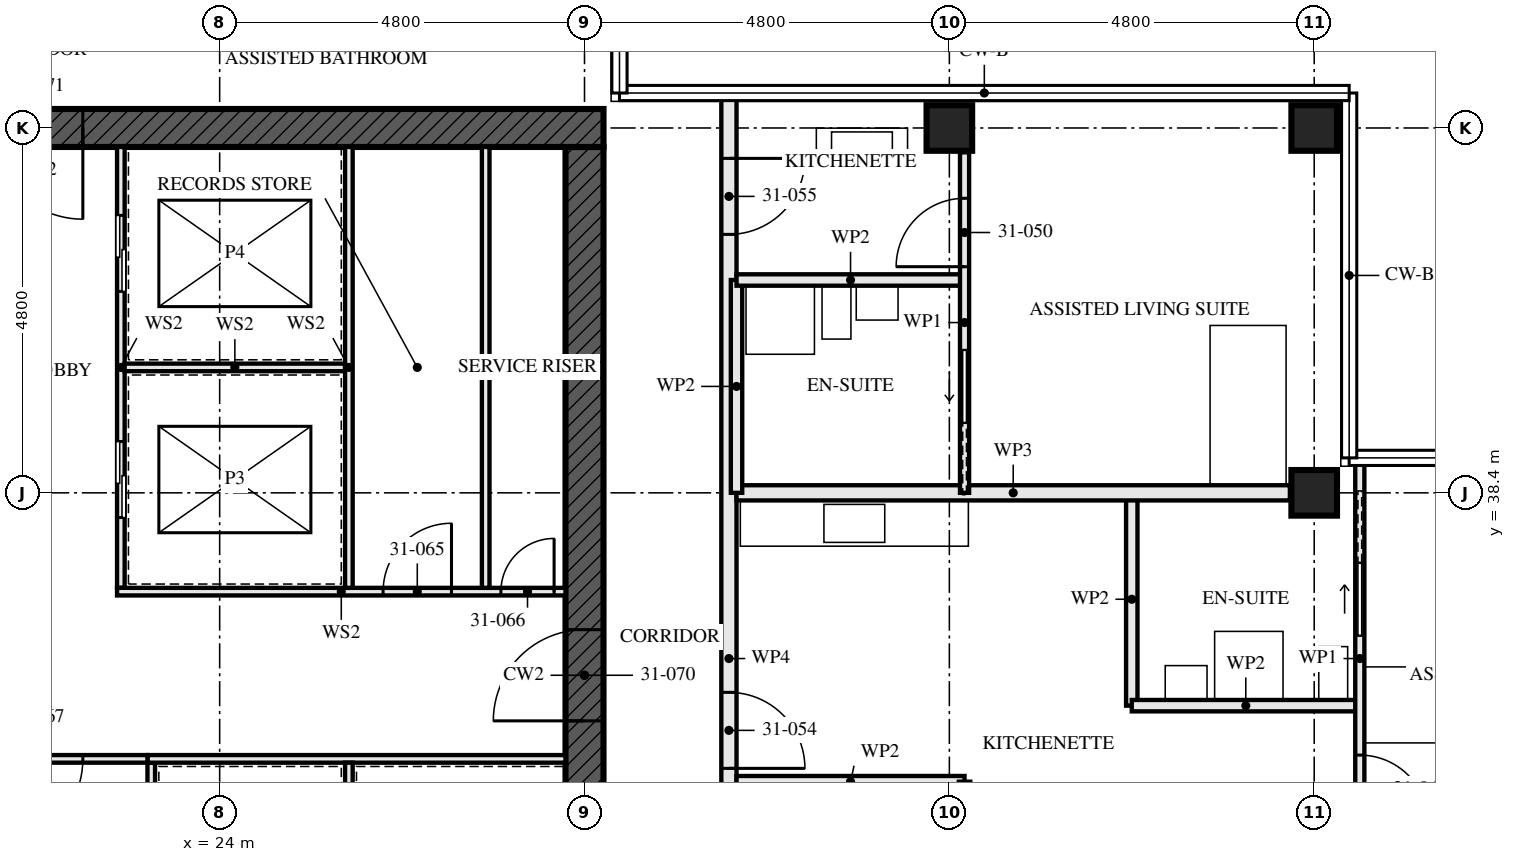
"""IFC4 building model, lengths in metres.
Left out: names, types, materials, properties, quantities, classifications, styles, units other than length and angle.
Written with IfcOpenShell. Run it as: python <this file> out.ifc"""

import sys

from ifc_helpers import new_model, si_unit, direction, frame, frame_2d, origin, origin_2d, place, context, subcontext, project, spatial, rectangle, hollow_rectangle, extrude, element, fill, save


model = new_model("IFC4")
c1 = context("Model", 3, precision=1e-05, world=origin(), true_north=direction((0.0, 1.0)))
c2 = subcontext(c1, "Body", "Model", "MODEL_VIEW")
j1 = project(units=[si_unit("LENGTHUNIT", "METRE"), si_unit("PLANEANGLEUNIT", "RADIAN")], contexts=[c1])
p1 = place(None, origin())
s1 = spatial("IfcSite", under=j1, at=p1, CompositionType="ELEMENT")
p2 = place(p1, origin())
s2 = spatial("IfcBuilding", under=s1, at=p2, CompositionType="ELEMENT")
p3 = place(p2, frame((0.0, 0.0, 115.5)))
s3 = spatial("IfcBuildingStorey", under=s2, at=p3, CompositionType="ELEMENT", Elevation=115.5)
for number, where, z_axis, x_axis in (
    (1, (33.6, 43.2, 0.0), (0.0, 0.0, 1.0), (0.0, 1.0, 0.0)),
    (2, (38.4, 38.4, 0.0), (0.0, 0.0, 1.0), (0.0, 1.0, 0.0)),
    (3, (38.4, 43.2, 0.0), (0.0, 0.0, 1.0), (0.0, 1.0, 0.0)),
):
    element("IfcColumn", number, at=place(p3, frame(where, z_axis=z_axis, x_axis=x_axis)), inside=s3, PredefinedType="COLUMN", context=c2, shape_type="SweptSolid", body=[
        extrude(hollow_rectangle(XDim=0.6, YDim=0.6, WallThickness=0.08, at=origin_2d()), origin(), (0.0, 0.0, 1.0), 3.5),
    ])
p4 = place(p3, frame((29.05, 43.2, -0.17), z_axis=(0.0, 0.0, 1.0), x_axis=(-1.0, 0.0, 0.0)))
e4 = element("IfcWall", 4, at=p4, inside=s3, PredefinedType="SHEAR", context=c2, shape_type="SweptSolid", body=[
    extrude(rectangle(XDim=14.9, YDim=0.5, at=frame_2d((7.45, 0.0))), origin(), (0.0, 0.0, 1.0), 3.5),
])
p5 = place(p4, frame((6.85, 0.0, 0.17)))
e5 = element("IfcOpeningElement", 5, at=p5, cuts=e4, PredefinedType="OPENING", context=c2, shape_type="SweptSolid", body=[
    extrude(rectangle(XDim=1.2, YDim=2.1, at=frame_2d((0.6, 1.05))), frame((0.0, 0.26, 0.0), z_axis=(0.0, -1.0, 0.0), x_axis=(1.0, 0.0, 0.0)), (0.0, 0.0, 1.0), 0.521),
])
p6 = place(p3, frame((28.8, 29.05, -0.17), z_axis=(0.0, 0.0, 1.0), x_axis=(0.0, 1.0, 0.0)))
e6 = element("IfcWall", 6, at=p6, inside=s3, PredefinedType="SHEAR", context=c2, shape_type="SweptSolid", body=[
    extrude(rectangle(XDim=13.9, YDim=0.5, at=frame_2d((6.95, 0.0))), origin(), (0.0, 0.0, 1.0), 3.5),
])
p7 = place(p6, frame((6.35, 0.0, 0.17)))
e7 = element("IfcOpeningElement", 7, at=p7, cuts=e6, PredefinedType="OPENING", context=c2, shape_type="SweptSolid", body=[
    extrude(rectangle(XDim=1.2, YDim=2.1, at=frame_2d((0.6, 1.05))), frame((0.0, 0.26, 0.0), z_axis=(0.0, -1.0, 0.0), x_axis=(1.0, 0.0, 0.0)), (0.0, 0.0, 1.0), 0.521),
])
p8 = place(p3, frame((33.8, 32.2, 0.0), z_axis=(0.0, 0.0, 1.0), x_axis=(0.0, 1.0, 0.0)))
e8 = element("IfcWall", 8, at=p8, inside=s3, PredefinedType="PARTITIONING", context=c2, shape_type="SweptSolid", body=[
    extrude(rectangle(XDim=2.4, YDim=0.15, at=frame_2d((1.2, 0.0))), origin(), (0.0, 0.0, 1.0), 2.55),
])
for number, where, z_axis, x_axis in (
    (9, (33.8, 34.6, 0.0), (0.0, 0.0, 1.0), (-1.0, 0.0, 0.0)),
    (10, (39.0, 35.6, 0.0), (0.0, 0.0, 1.0), (-1.0, 0.0, 0.0)),
):
    element("IfcWall", number, at=place(p3, frame(where, z_axis=z_axis, x_axis=x_axis)), inside=s3, PredefinedType="PARTITIONING", context=c2, shape_type="SweptSolid", body=[
        extrude(rectangle(XDim=3.0, YDim=0.15, at=frame_2d((1.5, 0.0))), origin(), (0.0, 0.0, 1.0), 3.33),
    ])
p9 = place(p3, frame((36.0, 35.6, 0.0), z_axis=(0.0, 0.0, 1.0), x_axis=(0.0, 1.0, 0.0)))
e11 = element("IfcWall", 11, at=p9, inside=s3, PredefinedType="PARTITIONING", context=c2, shape_type="SweptSolid", body=[
    extrude(rectangle(XDim=2.8, YDim=0.15, at=frame_2d((1.4, 0.0))), origin(), (0.0, 0.0, 1.0), 3.33),
])
p10 = place(p3, frame((39.0, 33.6, 0.0), z_axis=(0.0, 0.0, 1.0), x_axis=(0.0, 1.0, 0.0)))
e12 = element("IfcWall", 12, at=p10, inside=s3, PredefinedType="PARTITIONING", context=c2, shape_type="SweptSolid", body=[
    extrude(rectangle(XDim=5.24, YDim=0.12, at=frame_2d((2.62, 0.0))), origin(), (0.0, 0.0, 1.0), 2.32),
])
p11 = place(p10, frame((0.45, 0.0, 0.0)))
e13 = element("IfcOpeningElement", 13, at=p11, cuts=e12, PredefinedType="OPENING", context=c2, shape_type="SweptSolid", body=[
    extrude(rectangle(XDim=0.9, YDim=2.1, at=frame_2d((0.45, 1.05))), frame((0.0, 0.071, 0.0), z_axis=(0.0, -1.0, 0.0), x_axis=(1.0, 0.0, 0.0)), (0.0, 0.0, 1.0), 0.141),
])
p12 = place(p10, frame((2.925, 0.0, 0.0)))
e14 = element("IfcOpeningElement", 14, at=p12, cuts=e12, PredefinedType="OPENING", context=c2, shape_type="SweptSolid", body=[
    extrude(rectangle(XDim=0.95, YDim=2.1, at=frame_2d((0.475, 1.05))), frame((0.0, 0.071, 0.0), z_axis=(0.0, -1.0, 0.0), x_axis=(1.0, 0.0, 0.0)), (0.0, 0.0, 1.0), 0.141),
])
p13 = place(p3, frame((38.08, 38.4, 0.0), z_axis=(0.0, 0.0, 1.0), x_axis=(-1.0, 0.0, 0.0)))
e15 = element("IfcWall", 15, at=p13, inside=s3, PredefinedType="PARTITIONING", context=c2, shape_type="SweptSolid", body=[
    extrude(rectangle(XDim=7.28, YDim=0.2, at=frame_2d((3.64, 0.0))), origin(), (0.0, 0.0, 1.0), 2.55),
])
p14 = place(p3, frame((33.8, 41.2, 0.0), z_axis=(0.0, 0.0, 1.0), x_axis=(-1.0, 0.0, 0.0)))
e16 = element("IfcWall", 16, at=p14, inside=s3, PredefinedType="PARTITIONING", context=c2, shape_type="SweptSolid", body=[
    extrude(rectangle(XDim=3.0, YDim=0.15, at=frame_2d((1.5, 0.0))), origin(), (0.0, 0.0, 1.0), 3.33),
])
p15 = place(p3, frame((30.8, 38.4, 0.0), z_axis=(0.0, 0.0, 1.0), x_axis=(0.0, 1.0, 0.0)))
e17 = element("IfcWall", 17, at=p15, inside=s3, PredefinedType="PARTITIONING", context=c2, shape_type="SweptSolid", body=[
    extrude(rectangle(XDim=2.8, YDim=0.15, at=frame_2d((1.4, 0.0))), origin(), (0.0, 0.0, 1.0), 3.33),
])
p16 = place(p3, frame((33.8, 38.4, 0.0), z_axis=(0.0, 0.0, 1.0), x_axis=(0.0, 1.0, 0.0)))
e18 = element("IfcWall", 18, at=p16, inside=s3, PredefinedType="PARTITIONING", context=c2, shape_type="SweptSolid", body=[
    extrude(rectangle(XDim=4.48, YDim=0.12, at=frame_2d((2.24, 0.0))), origin(), (0.0, 0.0, 1.0), 3.33),
])
p17 = place(p16, frame((2.975, 0.0, 0.0)))
e19 = element("IfcOpeningElement", 19, at=p17, cuts=e18, PredefinedType="OPENING", context=c2, shape_type="SweptSolid", body=[
    extrude(rectangle(XDim=0.9, YDim=2.1, at=frame_2d((0.45, 1.05))), frame((0.0, 0.071, 0.0), z_axis=(0.0, -1.0, 0.0), x_axis=(1.0, 0.0, 0.0)), (0.0, 0.0, 1.0), 0.141),
])
p18 = place(p16, frame((0.925, 0.0, 0.0)))
e20 = element("IfcOpeningElement", 20, at=p18, cuts=e18, PredefinedType="OPENING", context=c2, shape_type="SweptSolid", body=[
    extrude(rectangle(XDim=0.95, YDim=2.1, at=frame_2d((0.475, 1.05))), frame((0.0, 0.071, 0.0), z_axis=(0.0, -1.0, 0.0), x_axis=(1.0, 0.0, 0.0)), (0.0, 0.0, 1.0), 0.141),
])
p19 = place(p3, frame((30.7, 28.8, 0.0), z_axis=(0.0, 0.0, 1.0), x_axis=(0.0, 1.0, 0.0)))
e21 = element("IfcWall", 21, at=p19, inside=s3, PredefinedType="PARTITIONING", context=c2, shape_type="SweptSolid", body=[
    extrude(rectangle(XDim=14.84, YDim=0.2, at=frame_2d((7.42, 0.0))), origin(), (0.0, 0.0, 1.0), 2.32),
])
p20 = place(p19, frame((1.4, 0.0, 0.0)))
e22 = element("IfcOpeningElement", 22, at=p20, cuts=e21, PredefinedType="OPENING", context=c2, shape_type="SweptSolid", body=[
    extrude(rectangle(XDim=1.0, YDim=2.1, at=frame_2d((0.5, 1.05))), frame((0.0, 0.111, 0.0), z_axis=(0.0, -1.0, 0.0), x_axis=(1.0, 0.0, 0.0)), (0.0, 0.0, 1.0), 0.221),
])
p21 = place(p19, frame((4.1, 0.0, 0.0)))
e23 = element("IfcOpeningElement", 23, at=p21, cuts=e21, PredefinedType="OPENING", context=c2, shape_type="SweptSolid", body=[
    extrude(rectangle(XDim=1.0, YDim=2.1, at=frame_2d((0.5, 1.05))), frame((0.0, 0.111, 0.0), z_axis=(0.0, -1.0, 0.0), x_axis=(1.0, 0.0, 0.0)), (0.0, 0.0, 1.0), 0.221),
])
p22 = place(p19, frame((5.975, 0.0, 0.0)))
e24 = element("IfcOpeningElement", 24, at=p22, cuts=e21, PredefinedType="OPENING", context=c2, shape_type="SweptSolid", body=[
    extrude(rectangle(XDim=1.0, YDim=2.1, at=frame_2d((0.5, 1.05))), frame((0.0, 0.111, 0.0), z_axis=(0.0, -1.0, 0.0), x_axis=(1.0, 0.0, 0.0)), (0.0, 0.0, 1.0), 0.221),
])
p23 = place(p19, frame((13.0, 0.0, 0.0)))
e25 = element("IfcOpeningElement", 25, at=p23, cuts=e21, PredefinedType="OPENING", context=c2, shape_type="SweptSolid", body=[
    extrude(rectangle(XDim=1.0, YDim=2.1, at=frame_2d((0.5, 1.05))), frame((0.0, 0.111, 0.0), z_axis=(0.0, -1.0, 0.0), x_axis=(1.0, 0.0, 0.0)), (0.0, 0.0, 1.0), 0.221),
])
p24 = place(p3, frame((27.5, 37.15, 0.0), z_axis=(0.0, 0.0, 1.0), x_axis=(0.0, 1.0, 0.0)))
e26 = element("IfcWall", 26, at=p24, inside=s3, PredefinedType="SOLIDWALL", context=c2, shape_type="SweptSolid", body=[
    extrude(rectangle(XDim=5.8, YDim=0.1, at=frame_2d((2.9, 0.0))), origin(), (0.0, 0.0, 1.0), 3.33),
])
p25 = place(p3, frame((22.7, 37.15, 0.0), z_axis=(0.0, 0.0, 1.0), x_axis=(0.0, 1.0, 0.0)))
e27 = element("IfcWall", 27, at=p25, inside=s3, PredefinedType="SOLIDWALL", context=c2, shape_type="SweptSolid", body=[
    extrude(rectangle(XDim=5.8, YDim=0.1, at=frame_2d((2.9, 0.0))), origin(), (0.0, 0.0, 1.0), 3.33),
])
p26 = place(p25, frame((0.925, 0.0, 0.0)))
e28 = element("IfcOpeningElement", 28, at=p26, cuts=e27, PredefinedType="OPENING", context=c2, shape_type="SweptSolid", body=[
    extrude(rectangle(XDim=1.0, YDim=2.1, at=frame_2d((0.5, 1.05))), frame((0.0, 0.061, 0.0), z_axis=(0.0, -1.0, 0.0), x_axis=(1.0, 0.0, 0.0)), (0.0, 0.0, 1.0), 0.121),
])
p27 = place(p25, frame((3.9, 0.0, 0.0)))
e29 = element("IfcOpeningElement", 29, at=p27, cuts=e27, PredefinedType="OPENING", context=c2, shape_type="SweptSolid", body=[
    extrude(rectangle(XDim=1.0, YDim=2.1, at=frame_2d((0.5, 1.05))), frame((0.0, 0.061, 0.0), z_axis=(0.0, -1.0, 0.0), x_axis=(1.0, 0.0, 0.0)), (0.0, 0.0, 1.0), 0.121),
])
p28 = place(p3, frame((23.1, 29.05, 0.0), z_axis=(0.0, 0.0, 1.0), x_axis=(0.0, 1.0, 0.0)))
e30 = element("IfcWall", 30, at=p28, inside=s3, PredefinedType="SOLIDWALL", context=c2, shape_type="SweptSolid", body=[
    extrude(rectangle(XDim=5.8, YDim=0.1, at=frame_2d((2.9, 0.0))), origin(), (0.0, 0.0, 1.0), 3.33),
])
p29 = place(p28, frame((1.0, 0.0, 0.0)))
e31 = element("IfcOpeningElement", 31, at=p29, cuts=e30, PredefinedType="OPENING", context=c2, shape_type="SweptSolid", body=[
    extrude(rectangle(XDim=0.7, YDim=2.1, at=frame_2d((0.35, 1.05))), frame((0.0, 0.061, 0.0), z_axis=(0.0, -1.0, 0.0), x_axis=(1.0, 0.0, 0.0)), (0.0, 0.0, 1.0), 0.121),
])
p30 = place(p3, frame((23.05, 34.9, 0.0), z_axis=(0.0, 0.0, 1.0), x_axis=(1.0, 0.0, 0.0)))
e32 = element("IfcWall", 32, at=p30, inside=s3, PredefinedType="SOLIDWALL", context=c2, shape_type="SweptSolid", body=[
    extrude(rectangle(XDim=5.5, YDim=0.1, at=frame_2d((2.75, 0.0))), origin(), (0.0, 0.0, 1.0), 3.33),
])
p31 = place(p3, frame((22.65, 37.1, 0.0), z_axis=(0.0, 0.0, 1.0), x_axis=(1.0, 0.0, 0.0)))
e33 = element("IfcWall", 33, at=p31, inside=s3, PredefinedType="SOLIDWALL", context=c2, shape_type="SweptSolid", body=[
    extrude(rectangle(XDim=5.9, YDim=0.1, at=frame_2d((2.95, 0.0))), origin(), (0.0, 0.0, 1.0), 3.33),
])
p32 = place(p31, frame((3.5, 0.0, 0.0)))
e34 = element("IfcOpeningElement", 34, at=p32, cuts=e33, PredefinedType="OPENING", context=c2, shape_type="SweptSolid", body=[
    extrude(rectangle(XDim=0.9, YDim=2.1, at=frame_2d((0.45, 1.05))), frame((0.0, 0.061, 0.0), z_axis=(0.0, -1.0, 0.0), x_axis=(1.0, 0.0, 0.0)), (0.0, 0.0, 1.0), 0.121),
])
p33 = place(p31, frame((5.05, 0.0, 0.0)))
e35 = element("IfcOpeningElement", 35, at=p33, cuts=e33, PredefinedType="OPENING", context=c2, shape_type="SweptSolid", body=[
    extrude(rectangle(XDim=0.7, YDim=2.1, at=frame_2d((0.35, 1.05))), frame((0.0, 0.061, 0.0), z_axis=(0.0, -1.0, 0.0), x_axis=(1.0, 0.0, 0.0)), (0.0, 0.0, 1.0), 0.121),
])
p34 = place(p3, frame((20.55, 34.9, 0.0), z_axis=(0.0, 0.0, 1.0), x_axis=(1.0, 0.0, 0.0)))
e36 = element("IfcWall", 36, at=p34, inside=s3, PredefinedType="SOLIDWALL", context=c2, shape_type="SweptSolid", body=[
    extrude(rectangle(XDim=2.5, YDim=0.1, at=frame_2d((1.25, 0.0))), origin(), (0.0, 0.0, 1.0), 3.33),
])
p35 = place(p34, frame((0.45, 0.0, 0.0)))
e37 = element("IfcOpeningElement", 37, at=p35, cuts=e36, PredefinedType="OPENING", context=c2, shape_type="SweptSolid", body=[
    extrude(rectangle(XDim=1.2, YDim=2.1, at=frame_2d((0.6, 1.05))), frame((0.0, 0.061, 0.0), z_axis=(0.0, -1.0, 0.0), x_axis=(1.0, 0.0, 0.0)), (0.0, 0.0, 1.0), 0.121),
])
p36 = place(p3, frame((22.75, 40.05, 0.0), z_axis=(0.0, 0.0, 1.0), x_axis=(1.0, 0.0, 0.0)))
e38 = element("IfcWall", 38, at=p36, inside=s3, PredefinedType="SOLIDWALL", context=c2, shape_type="SweptSolid", body=[
    extrude(rectangle(XDim=2.9, YDim=0.1, at=frame_2d((1.45, 0.0))), origin(), (0.0, 0.0, 1.0), 3.33),
])
p37 = place(p3, frame((25.7, 37.15, 0.0), z_axis=(0.0, 0.0, 1.0), x_axis=(0.0, 1.0, 0.0)))
e39 = element("IfcWall", 39, at=p37, inside=s3, PredefinedType="SOLIDWALL", context=c2, shape_type="SweptSolid", body=[
    extrude(rectangle(XDim=5.8, YDim=0.1, at=frame_2d((2.9, 0.0))), origin(), (0.0, 0.0, 1.0), 3.33),
])
p38 = place(p3, frame((25.7, 31.95, 0.0), z_axis=(0.0, 0.0, 1.0), x_axis=(0.0, 1.0, 0.0)))
e40 = element("IfcWall", 40, at=p38, inside=s3, PredefinedType="SOLIDWALL", context=c2, shape_type="SweptSolid", body=[
    extrude(rectangle(XDim=2.9, YDim=0.1, at=frame_2d((1.45, 0.0))), origin(), (0.0, 0.0, 1.0), 3.33),
])
p39 = place(p11, frame((0.9, 0.0, 0.0), z_axis=(0.0, 0.0, 1.0), x_axis=(-1.0, 0.0, 0.0)))
e41 = element("IfcDoor", 41, at=p39, inside=s3, OperationType="SINGLE_SWING_LEFT", PredefinedType="DOOR", context=c2, shape_type="SweptSolid", body=[
    extrude(rectangle(XDim=0.9, YDim=2.1, at=frame_2d((0.45, 1.05))), frame((0.0, 0.022, 0.0), z_axis=(0.0, -1.0, 0.0), x_axis=(1.0, 0.0, 0.0)), (0.0, 0.0, 1.0), 0.044),
])
fill(e13, e41)
p40 = place(p12, origin())
e42 = element("IfcDoor", 42, at=p40, inside=s3, OperationType="SLIDING_TO_LEFT", PredefinedType="DOOR", context=c2, shape_type="SweptSolid", body=[
    extrude(rectangle(XDim=0.95, YDim=2.1, at=frame_2d((0.475, 1.05))), frame((0.0, 0.022, 0.0), z_axis=(0.0, -1.0, 0.0), x_axis=(1.0, 0.0, 0.0)), (0.0, 0.0, 1.0), 0.044),
])
fill(e14, e42)
p41 = place(p17, origin())
e43 = element("IfcDoor", 43, at=p41, inside=s3, OperationType="SINGLE_SWING_RIGHT", PredefinedType="DOOR", context=c2, shape_type="SweptSolid", body=[
    extrude(rectangle(XDim=0.9, YDim=2.1, at=frame_2d((0.45, 1.05))), frame((0.0, 0.022, 0.0), z_axis=(0.0, -1.0, 0.0), x_axis=(1.0, 0.0, 0.0)), (0.0, 0.0, 1.0), 0.044),
])
fill(e19, e43)
p42 = place(p18, origin())
e44 = element("IfcDoor", 44, at=p42, inside=s3, OperationType="SLIDING_TO_RIGHT", PredefinedType="DOOR", context=c2, shape_type="SweptSolid", body=[
    extrude(rectangle(XDim=0.95, YDim=2.1, at=frame_2d((0.475, 1.05))), frame((0.0, 0.022, 0.0), z_axis=(0.0, -1.0, 0.0), x_axis=(1.0, 0.0, 0.0)), (0.0, 0.0, 1.0), 0.044),
])
fill(e20, e44)
p43 = place(p22, frame((1.0, 0.0, 0.0), z_axis=(0.0, 0.0, 1.0), x_axis=(-1.0, 0.0, 0.0)))
e45 = element("IfcDoor", 45, at=p43, inside=s3, OperationType="SINGLE_SWING_LEFT", PredefinedType="DOOR", context=c2, shape_type="SweptSolid", body=[
    extrude(rectangle(XDim=1.0, YDim=2.1, at=frame_2d((0.5, 1.05))), frame((0.0, 0.027, 0.0), z_axis=(0.0, -1.0, 0.0), x_axis=(1.0, 0.0, 0.0)), (0.0, 0.0, 1.0), 0.054),
])
fill(e24, e45)
p44 = place(p23, frame((1.0, 0.0, 0.0), z_axis=(0.0, 0.0, 1.0), x_axis=(-1.0, 0.0, 0.0)))
e46 = element("IfcDoor", 46, at=p44, inside=s3, OperationType="SINGLE_SWING_RIGHT", PredefinedType="DOOR", context=c2, shape_type="SweptSolid", body=[
    extrude(rectangle(XDim=1.0, YDim=2.1, at=frame_2d((0.5, 1.05))), frame((0.0, 0.027, 0.0), z_axis=(0.0, -1.0, 0.0), x_axis=(1.0, 0.0, 0.0)), (0.0, 0.0, 1.0), 0.054),
])
fill(e25, e46)
p45 = place(p26, origin())
e47 = element("IfcDoor", 47, at=p45, inside=s3, OperationType="SLIDING_TO_LEFT", PredefinedType="DOOR", context=c2, shape_type="SweptSolid", body=[
    extrude(rectangle(XDim=1.0, YDim=2.1, at=frame_2d((0.5, 1.05))), frame((0.0, 0.05, 0.0), z_axis=(0.0, -1.0, 0.0), x_axis=(1.0, 0.0, 0.0)), (0.0, 0.0, 1.0), 0.1),
])
fill(e28, e47)
p46 = place(p27, origin())
e48 = element("IfcDoor", 48, at=p46, inside=s3, OperationType="SLIDING_TO_LEFT", PredefinedType="DOOR", context=c2, shape_type="SweptSolid", body=[
    extrude(rectangle(XDim=1.0, YDim=2.1, at=frame_2d((0.5, 1.05))), frame((0.0, 0.05, 0.0), z_axis=(0.0, -1.0, 0.0), x_axis=(1.0, 0.0, 0.0)), (0.0, 0.0, 1.0), 0.1),
])
fill(e29, e48)
p47 = place(p32, origin())
e49 = element("IfcDoor", 49, at=p47, inside=s3, OperationType="SINGLE_SWING_LEFT", PredefinedType="DOOR", context=c2, shape_type="SweptSolid", body=[
    extrude(rectangle(XDim=0.9, YDim=2.1, at=frame_2d((0.45, 1.05))), frame((0.0, 0.027, 0.0), z_axis=(0.0, -1.0, 0.0), x_axis=(1.0, 0.0, 0.0)), (0.0, 0.0, 1.0), 0.054),
])
fill(e34, e49)
p48 = place(p33, origin())
e50 = element("IfcDoor", 50, at=p48, inside=s3, OperationType="SINGLE_SWING_LEFT", PredefinedType="DOOR", context=c2, shape_type="SweptSolid", body=[
    extrude(rectangle(XDim=0.7, YDim=2.1, at=frame_2d((0.35, 1.05))), frame((0.0, 0.027, 0.0), z_axis=(0.0, -1.0, 0.0), x_axis=(1.0, 0.0, 0.0)), (0.0, 0.0, 1.0), 0.054),
])
fill(e35, e50)
p49 = place(p35, frame((1.2, 0.0, 0.0), z_axis=(0.0, 0.0, 1.0), x_axis=(-1.0, 0.0, 0.0)))
e51 = element("IfcDoor", 51, at=p49, inside=s3, OperationType="SINGLE_SWING_LEFT", PredefinedType="DOOR", context=c2, shape_type="SweptSolid", body=[
    extrude(rectangle(XDim=1.2, YDim=2.1, at=frame_2d((0.6, 1.05))), frame((0.0, 0.027, 0.0), z_axis=(0.0, -1.0, 0.0), x_axis=(1.0, 0.0, 0.0)), (0.0, 0.0, 1.0), 0.054),
])
fill(e37, e51)
p50 = place(p7, origin())
e52 = element("IfcDoor", 52, at=p50, inside=s3, OperationType="SINGLE_SWING_LEFT", PredefinedType="DOOR", context=c2, shape_type="SweptSolid", body=[
    extrude(rectangle(XDim=1.2, YDim=2.1, at=frame_2d((0.6, 1.05))), frame((0.0, 0.027, 0.0), z_axis=(0.0, -1.0, 0.0), x_axis=(1.0, 0.0, 0.0)), (0.0, 0.0, 1.0), 0.054),
])
fill(e7, e52)
p51 = place(p5, origin())
e53 = element("IfcDoor", 53, at=p51, inside=s3, OperationType="SINGLE_SWING_LEFT", PredefinedType="DOOR", context=c2, shape_type="SweptSolid", body=[
    extrude(rectangle(XDim=1.2, YDim=2.1, at=frame_2d((0.6, 1.05))), frame((0.0, 0.027, 0.0), z_axis=(0.0, -1.0, 0.0), x_axis=(1.0, 0.0, 0.0)), (0.0, 0.0, 1.0), 0.054),
])
fill(e5, e53)
save(model, sys.argv[1])
